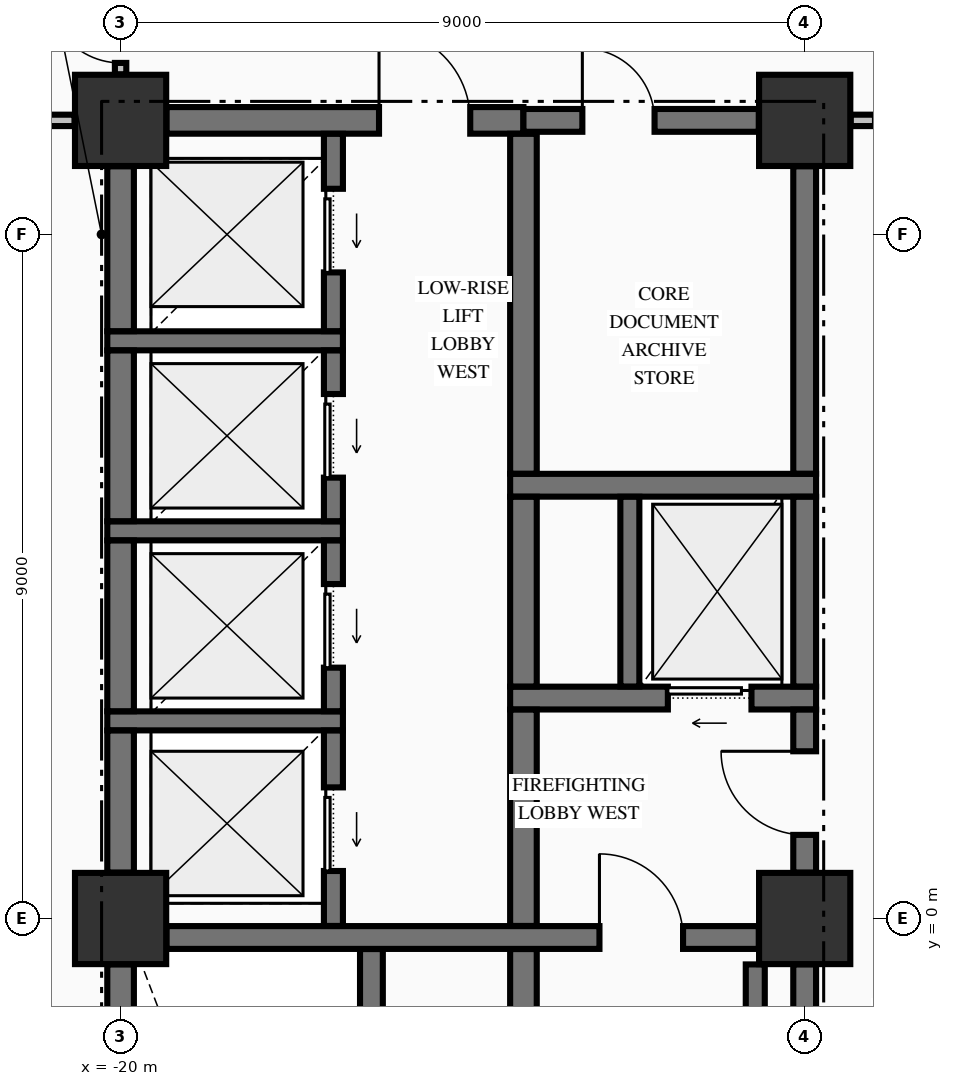
"""IFC4 building model, lengths in metres.
Left out: names, types, materials, properties, quantities, classifications, styles, units other than length and angle.
Written with IfcOpenShell. Run it as: python <this file> out.ifc"""

import sys

from ifc_helpers import new_model, si_unit, direction, frame, frame_2d, origin, origin_2d, place, context, subcontext, project, spatial, rectangle, extrude, element, fill, save


model = new_model("IFC4")
c1 = context("Model", 3, precision=1e-05, world=origin(), true_north=direction((0.0, 1.0)))
c2 = subcontext(c1, "Body", "Model", "MODEL_VIEW")
j1 = project(units=[si_unit("LENGTHUNIT", "METRE"), si_unit("PLANEANGLEUNIT", "RADIAN")], contexts=[c1])
p1 = place(None, origin())
s1 = spatial("IfcSite", under=j1, at=p1, CompositionType="ELEMENT")
p2 = place(p1, origin())
s2 = spatial("IfcBuilding", under=s1, at=p2, CompositionType="ELEMENT")
p3 = place(p2, frame((0.0, 0.0, 37.91)))
s3 = spatial("IfcBuildingStorey", under=s2, at=p3, CompositionType="ELEMENT", Elevation=37.91)
for number, where, z_axis, x_axis in (
    (1, (-20.0, 10.5, -0.25), (0.0, 0.0, 1.0), (1.0, 0.0, 0.0)),
    (2, (-11.0, 0.0, -0.25), (0.0, 0.0, 1.0), (1.0, 0.0, 0.0)),
    (3, (-11.0, 10.5, -0.25), (0.0, 0.0, 1.0), (1.0, 0.0, 0.0)),
    (4, (-20.0, 0.0, -0.25), (0.0, 0.0, 1.0), (1.0, 0.0, 0.0)),
):
    element("IfcColumn", number, at=place(p3, frame(where, z_axis=z_axis, x_axis=x_axis)), inside=s3, PredefinedType="COLUMN", context=c2, shape_type="SweptSolid", body=[
        extrude(rectangle(XDim=1.2, YDim=1.2, at=origin_2d()), origin(), (0.0, 0.0, 1.0), 3.57),
    ])
p4 = place(p3, frame((-19.396, -0.25, 0.0), z_axis=(0.0, 0.0, 1.0), x_axis=(1.0, 0.0, 0.0)))
e5 = element("IfcWall", 5, at=p4, inside=s3, PredefinedType="SHEAR", context=c2, shape_type="SweptSolid", body=[
    extrude(rectangle(XDim=7.792, YDim=0.3, at=frame_2d((3.896, 0.0))), origin(), (0.0, 0.0, 1.0), 3.32),
])
p5 = place(p4, frame((5.696, 0.0, 0.0)))
e6 = element("IfcOpeningElement", 6, at=p5, cuts=e5, PredefinedType="OPENING", context=c2, shape_type="SweptSolid", body=[
    extrude(rectangle(XDim=1.1, YDim=2.15, at=frame_2d((0.55, 1.075))), frame((0.0, 0.16, 0.0), z_axis=(0.0, -1.0, 0.0), x_axis=(1.0, 0.0, 0.0)), (0.0, 0.0, 1.0), 0.32),
])
p6 = place(p3, frame((-20.175, 2.6, 0.0), z_axis=(0.0, 0.0, 1.0), x_axis=(1.0, 0.0, 0.0)))
e7 = element("IfcWall", 7, at=p6, inside=s3, PredefinedType="SOLIDWALL", context=c2, shape_type="SweptSolid", body=[
    extrude(rectangle(XDim=3.1, YDim=0.25, at=frame_2d((1.55, 0.0))), origin(), (0.0, 0.0, 1.0), 3.32),
])
p7 = place(p3, frame((-14.875, 2.9, 0.0), z_axis=(0.0, 0.0, 1.0), x_axis=(1.0, 0.0, 0.0)))
e8 = element("IfcWall", 8, at=p7, inside=s3, PredefinedType="SHEAR", context=c2, shape_type="SweptSolid", body=[
    extrude(rectangle(XDim=4.025, YDim=0.3, at=frame_2d((2.012, 0.0))), origin(), (0.0, 0.0, 1.0), 3.32),
])
p8 = place(p7, frame((2.075, 0.0, 0.0)))
e9 = element("IfcOpeningElement", 9, at=p8, cuts=e8, PredefinedType="OPENING", context=c2, shape_type="SweptSolid", body=[
    extrude(rectangle(XDim=1.1, YDim=2.2, at=frame_2d((0.55, 1.1))), frame((0.0, 0.16, 0.0), z_axis=(0.0, -1.0, 0.0), x_axis=(1.0, 0.0, 0.0)), (0.0, 0.0, 1.0), 0.32),
])
p9 = place(p3, frame((-20.175, 5.1, 0.0), z_axis=(0.0, 0.0, 1.0), x_axis=(1.0, 0.0, 0.0)))
e10 = element("IfcWall", 10, at=p9, inside=s3, PredefinedType="SOLIDWALL", context=c2, shape_type="SweptSolid", body=[
    extrude(rectangle(XDim=3.1, YDim=0.25, at=frame_2d((1.55, 0.0))), origin(), (0.0, 0.0, 1.0), 3.32),
])
p10 = place(p3, frame((-14.875, 5.7, 0.0), z_axis=(0.0, 0.0, 1.0), x_axis=(1.0, 0.0, 0.0)))
e11 = element("IfcWall", 11, at=p10, inside=s3, PredefinedType="SHEAR", context=c2, shape_type="SweptSolid", body=[
    extrude(rectangle(XDim=4.025, YDim=0.3, at=frame_2d((2.012, 0.0))), origin(), (0.0, 0.0, 1.0), 3.32),
])
p11 = place(p3, frame((-20.175, 7.6, 0.0), z_axis=(0.0, 0.0, 1.0), x_axis=(1.0, 0.0, 0.0)))
e12 = element("IfcWall", 12, at=p11, inside=s3, PredefinedType="SOLIDWALL", context=c2, shape_type="SweptSolid", body=[
    extrude(rectangle(XDim=3.1, YDim=0.25, at=frame_2d((1.55, 0.0))), origin(), (0.0, 0.0, 1.0), 3.32),
])
p12 = place(p3, frame((-19.396, 10.5, 0.0), z_axis=(0.0, 0.0, 1.0), x_axis=(1.0, 0.0, 0.0)))
e13 = element("IfcWall", 13, at=p12, inside=s3, PredefinedType="SHEAR", context=c2, shape_type="SweptSolid", body=[
    extrude(rectangle(XDim=4.696, YDim=0.35, at=frame_2d((2.348, 0.0))), origin(), (0.0, 0.0, 1.0), 3.32),
])
p13 = place(p12, frame((2.796, 0.0, 0.0)))
e14 = element("IfcOpeningElement", 14, at=p13, cuts=e13, PredefinedType="OPENING", context=c2, shape_type="SweptSolid", body=[
    extrude(rectangle(XDim=1.2, YDim=2.15, at=frame_2d((0.6, 1.075))), frame((0.0, 0.185, 0.0), z_axis=(0.0, -1.0, 0.0), x_axis=(1.0, 0.0, 0.0)), (0.0, 0.0, 1.0), 0.37),
])
p14 = place(p3, frame((-14.7, 10.5, 0.0), z_axis=(0.0, 0.0, 1.0), x_axis=(1.0, 0.0, 0.0)))
e15 = element("IfcWall", 15, at=p14, inside=s3, PredefinedType="SHEAR", context=c2, shape_type="SweptSolid", body=[
    extrude(rectangle(XDim=3.096, YDim=0.3, at=frame_2d((1.548, 0.0))), origin(), (0.0, 0.0, 1.0), 3.32),
])
p15 = place(p14, frame((0.775, 0.0, 0.0)))
e16 = element("IfcOpeningElement", 16, at=p15, cuts=e15, PredefinedType="OPENING", context=c2, shape_type="SweptSolid", body=[
    extrude(rectangle(XDim=0.95, YDim=2.15, at=frame_2d((0.475, 1.075))), frame((0.0, 0.16, 0.0), z_axis=(0.0, -1.0, 0.0), x_axis=(1.0, 0.0, 0.0)), (0.0, 0.0, 1.0), 0.32),
])
p16 = place(p3, frame((-23.835, 10.5, 0.0), z_axis=(0.0, 0.0, 1.0), x_axis=(1.0, 0.0, 0.0)))
e17 = element("IfcWall", 17, at=p16, inside=s3, PredefinedType="PARTITIONING", context=c2, shape_type="SweptSolid", body=[
    extrude(rectangle(XDim=3.229, YDim=0.15, at=frame_2d((1.615, 0.0))), origin(), (0.0, 0.0, 1.0), 3.32),
])
p17 = place(p16, frame((1.335, 0.0, 0.0)))
e18 = element("IfcOpeningElement", 18, at=p17, cuts=e17, PredefinedType="OPENING", context=c2, shape_type="SweptSolid", body=[
    extrude(rectangle(XDim=1.0, YDim=2.15, at=frame_2d((0.5, 1.075))), frame((0.0, 0.085, 0.0), z_axis=(0.0, -1.0, 0.0), x_axis=(1.0, 0.0, 0.0)), (0.0, 0.0, 1.0), 0.17),
])
p18 = place(p3, frame((-10.394, 10.5, 0.0), z_axis=(0.0, 0.0, 1.0), x_axis=(1.0, 0.0, 0.0)))
e19 = element("IfcWall", 19, at=p18, inside=s3, PredefinedType="PARTITIONING", context=c2, shape_type="SweptSolid", body=[
    extrude(rectangle(XDim=20.788, YDim=0.15, at=frame_2d((10.394, 0.0))), origin(), (0.0, 0.0, 1.0), 3.32),
])
p19 = place(p18, frame((0.319, 0.0, 0.0)))
e20 = element("IfcOpeningElement", 20, at=p19, cuts=e19, PredefinedType="OPENING", context=c2, shape_type="SweptSolid", body=[
    extrude(rectangle(XDim=1.05, YDim=2.15, at=frame_2d((0.525, 1.075))), frame((0.0, 0.085, 0.0), z_axis=(0.0, -1.0, 0.0), x_axis=(1.0, 0.0, 0.0)), (0.0, 0.0, 1.0), 0.17),
])
p20 = place(p18, frame((19.419, 0.0, 0.0)))
e21 = element("IfcOpeningElement", 21, at=p20, cuts=e19, PredefinedType="OPENING", context=c2, shape_type="SweptSolid", body=[
    extrude(rectangle(XDim=1.05, YDim=2.15, at=frame_2d((0.525, 1.075))), frame((0.0, 0.085, 0.0), z_axis=(0.0, -1.0, 0.0), x_axis=(1.0, 0.0, 0.0)), (0.0, 0.0, 1.0), 0.17),
])
p21 = place(p3, frame((-20.0, -9.346, 0.0), z_axis=(0.0, 0.0, 1.0), x_axis=(0.0, 1.0, 0.0)))
e22 = element("IfcWall", 22, at=p21, inside=s3, PredefinedType="SHEAR", context=c2, shape_type="SweptSolid", body=[
    extrude(rectangle(XDim=8.742, YDim=0.35, at=frame_2d((4.371, 0.0))), origin(), (0.0, 0.0, 1.0), 3.32),
])
p22 = place(p3, frame((-20.0, 0.604, 0.0), z_axis=(0.0, 0.0, 1.0), x_axis=(0.0, 1.0, 0.0)))
e23 = element("IfcWall", 23, at=p22, inside=s3, PredefinedType="SHEAR", context=c2, shape_type="SweptSolid", body=[
    extrude(rectangle(XDim=1.869, YDim=0.35, at=frame_2d((0.935, 0.0))), origin(), (0.0, 0.0, 1.0), 3.32),
])
for number, where, z_axis, x_axis in (
    (24, (-20.0, 2.727, 0.0), (0.0, 0.0, 1.0), (0.0, 1.0, 0.0)),
    (25, (-20.0, 5.227, 0.0), (0.0, 0.0, 1.0), (0.0, 1.0, 0.0)),
):
    element("IfcWall", number, at=place(p3, frame(where, z_axis=z_axis, x_axis=x_axis)), inside=s3, PredefinedType="SHEAR", context=c2, shape_type="SweptSolid", body=[
        extrude(rectangle(XDim=2.246, YDim=0.35, at=frame_2d((1.123, 0.0))), origin(), (0.0, 0.0, 1.0), 3.32),
    ])
p23 = place(p3, frame((-20.0, 7.727, 0.0), z_axis=(0.0, 0.0, 1.0), x_axis=(0.0, 1.0, 0.0)))
e26 = element("IfcWall", 26, at=p23, inside=s3, PredefinedType="SHEAR", context=c2, shape_type="SweptSolid", body=[
    extrude(rectangle(XDim=2.169, YDim=0.35, at=frame_2d((1.084, 0.0))), origin(), (0.0, 0.0, 1.0), 3.32),
])
p24 = place(p3, frame((-17.2, -0.098, 0.0), z_axis=(0.0, 0.0, 1.0), x_axis=(0.0, 1.0, 0.0)))
e27 = element("IfcWall", 27, at=p24, inside=s3, PredefinedType="SOLIDWALL", context=c2, shape_type="SweptSolid", body=[
    extrude(rectangle(XDim=2.571, YDim=0.25, at=frame_2d((1.285, 0.0))), origin(), (0.0, 0.0, 1.0), 3.32),
])
p25 = place(p24, frame((0.723, 0.0, 0.0)))
e28 = element("IfcOpeningElement", 28, at=p25, cuts=e27, PredefinedType="OPENING", context=c2, shape_type="SweptSolid", body=[
    extrude(rectangle(XDim=1.1, YDim=2.2, at=frame_2d((0.55, 1.1))), frame((0.0, 0.135, 0.0), z_axis=(0.0, -1.0, 0.0), x_axis=(1.0, 0.0, 0.0)), (0.0, 0.0, 1.0), 0.27),
])
p26 = place(p3, frame((-17.2, 2.727, 0.0), z_axis=(0.0, 0.0, 1.0), x_axis=(0.0, 1.0, 0.0)))
e29 = element("IfcWall", 29, at=p26, inside=s3, PredefinedType="SOLIDWALL", context=c2, shape_type="SweptSolid", body=[
    extrude(rectangle(XDim=2.246, YDim=0.25, at=frame_2d((1.123, 0.0))), origin(), (0.0, 0.0, 1.0), 3.32),
])
p27 = place(p26, frame((0.573, 0.0, 0.0)))
e30 = element("IfcOpeningElement", 30, at=p27, cuts=e29, PredefinedType="OPENING", context=c2, shape_type="SweptSolid", body=[
    extrude(rectangle(XDim=1.1, YDim=2.2, at=frame_2d((0.55, 1.1))), frame((0.0, 0.135, 0.0), z_axis=(0.0, -1.0, 0.0), x_axis=(1.0, 0.0, 0.0)), (0.0, 0.0, 1.0), 0.27),
])
p28 = place(p3, frame((-17.2, 5.227, 0.0), z_axis=(0.0, 0.0, 1.0), x_axis=(0.0, 1.0, 0.0)))
e31 = element("IfcWall", 31, at=p28, inside=s3, PredefinedType="SOLIDWALL", context=c2, shape_type="SweptSolid", body=[
    extrude(rectangle(XDim=2.246, YDim=0.25, at=frame_2d((1.123, 0.0))), origin(), (0.0, 0.0, 1.0), 3.32),
])
p29 = place(p28, frame((0.573, 0.0, 0.0)))
e32 = element("IfcOpeningElement", 32, at=p29, cuts=e31, PredefinedType="OPENING", context=c2, shape_type="SweptSolid", body=[
    extrude(rectangle(XDim=1.1, YDim=2.2, at=frame_2d((0.55, 1.1))), frame((0.0, 0.135, 0.0), z_axis=(0.0, -1.0, 0.0), x_axis=(1.0, 0.0, 0.0)), (0.0, 0.0, 1.0), 0.27),
])
p30 = place(p3, frame((-17.2, 7.727, 0.0), z_axis=(0.0, 0.0, 1.0), x_axis=(0.0, 1.0, 0.0)))
e33 = element("IfcWall", 33, at=p30, inside=s3, PredefinedType="SOLIDWALL", context=c2, shape_type="SweptSolid", body=[
    extrude(rectangle(XDim=2.596, YDim=0.25, at=frame_2d((1.298, 0.0))), origin(), (0.0, 0.0, 1.0), 3.32),
])
p31 = place(p30, frame((0.773, 0.0, 0.0)))
e34 = element("IfcOpeningElement", 34, at=p31, cuts=e33, PredefinedType="OPENING", context=c2, shape_type="SweptSolid", body=[
    extrude(rectangle(XDim=1.1, YDim=2.2, at=frame_2d((0.55, 1.1))), frame((0.0, 0.135, 0.0), z_axis=(0.0, -1.0, 0.0), x_axis=(1.0, 0.0, 0.0)), (0.0, 0.0, 1.0), 0.27),
])
p32 = place(p3, frame((-16.7, -9.773, 0.0), z_axis=(0.0, 0.0, 1.0), x_axis=(0.0, 1.0, 0.0)))
e35 = element("IfcWall", 35, at=p32, inside=s3, PredefinedType="SHEAR", context=c2, shape_type="SweptSolid", body=[
    extrude(rectangle(XDim=9.371, YDim=0.3, at=frame_2d((4.686, 0.0))), origin(), (0.0, 0.0, 1.0), 3.32),
])
p33 = place(p3, frame((-14.7, -9.773, 0.0), z_axis=(0.0, 0.0, 1.0), x_axis=(0.0, 1.0, 0.0)))
e36 = element("IfcWall", 36, at=p33, inside=s3, PredefinedType="SHEAR", context=c2, shape_type="SweptSolid", body=[
    extrude(rectangle(XDim=9.371, YDim=0.35, at=frame_2d((4.686, 0.0))), origin(), (0.0, 0.0, 1.0), 3.32),
])
p34 = place(p3, frame((-14.7, -0.098, 0.0), z_axis=(0.0, 0.0, 1.0), x_axis=(0.0, 1.0, 0.0)))
e37 = element("IfcWall", 37, at=p34, inside=s3, PredefinedType="SHEAR", context=c2, shape_type="SweptSolid", body=[
    extrude(rectangle(XDim=2.846, YDim=0.35, at=frame_2d((1.423, 0.0))), origin(), (0.0, 0.0, 1.0), 3.32),
])
p35 = place(p3, frame((-14.7, 3.052, 0.0), z_axis=(0.0, 0.0, 1.0), x_axis=(0.0, 1.0, 0.0)))
e38 = element("IfcWall", 38, at=p35, inside=s3, PredefinedType="SHEAR", context=c2, shape_type="SweptSolid", body=[
    extrude(rectangle(XDim=2.496, YDim=0.35, at=frame_2d((1.248, 0.0))), origin(), (0.0, 0.0, 1.0), 3.32),
])
p36 = place(p3, frame((-14.7, 5.852, 0.0), z_axis=(0.0, 0.0, 1.0), x_axis=(0.0, 1.0, 0.0)))
e39 = element("IfcWall", 39, at=p36, inside=s3, PredefinedType="SHEAR", context=c2, shape_type="SweptSolid", body=[
    extrude(rectangle(XDim=4.471, YDim=0.35, at=frame_2d((2.235, 0.0))), origin(), (0.0, 0.0, 1.0), 3.32),
])
p37 = place(p3, frame((-13.3, 3.052, 0.0), z_axis=(0.0, 0.0, 1.0), x_axis=(0.0, 1.0, 0.0)))
e40 = element("IfcWall", 40, at=p37, inside=s3, PredefinedType="SOLIDWALL", context=c2, shape_type="SweptSolid", body=[
    extrude(rectangle(XDim=2.496, YDim=0.25, at=frame_2d((1.248, 0.0))), origin(), (0.0, 0.0, 1.0), 3.32),
])
p38 = place(p3, frame((-11.65, -9.346, 0.0), z_axis=(0.0, 0.0, 1.0), x_axis=(0.0, 1.0, 0.0)))
e41 = element("IfcWall", 41, at=p38, inside=s3, PredefinedType="SOLIDWALL", context=c2, shape_type="SweptSolid", body=[
    extrude(rectangle(XDim=8.742, YDim=0.25, at=frame_2d((4.371, 0.0))), origin(), (0.0, 0.0, 1.0), 3.32),
])
p39 = place(p3, frame((-11.0, -9.346, 0.0), z_axis=(0.0, 0.0, 1.0), x_axis=(0.0, 1.0, 0.0)))
e42 = element("IfcWall", 42, at=p39, inside=s3, PredefinedType="SHEAR", context=c2, shape_type="SweptSolid", body=[
    extrude(rectangle(XDim=8.742, YDim=0.3, at=frame_2d((4.371, 0.0))), origin(), (0.0, 0.0, 1.0), 3.32),
])
p40 = place(p3, frame((-11.0, 0.604, 0.0), z_axis=(0.0, 0.0, 1.0), x_axis=(0.0, 1.0, 0.0)))
e43 = element("IfcWall", 43, at=p40, inside=s3, PredefinedType="SHEAR", context=c2, shape_type="SweptSolid", body=[
    extrude(rectangle(XDim=2.144, YDim=0.3, at=frame_2d((1.072, 0.0))), origin(), (0.0, 0.0, 1.0), 3.32),
])
p41 = place(p40, frame((0.496, 0.0, 0.0)))
e44 = element("IfcOpeningElement", 44, at=p41, cuts=e43, PredefinedType="OPENING", context=c2, shape_type="SweptSolid", body=[
    extrude(rectangle(XDim=1.1, YDim=2.15, at=frame_2d((0.55, 1.075))), frame((0.0, 0.16, 0.0), z_axis=(0.0, -1.0, 0.0), x_axis=(1.0, 0.0, 0.0)), (0.0, 0.0, 1.0), 0.32),
])
p42 = place(p3, frame((-11.0, 3.052, 0.0), z_axis=(0.0, 0.0, 1.0), x_axis=(0.0, 1.0, 0.0)))
e45 = element("IfcWall", 45, at=p42, inside=s3, PredefinedType="SHEAR", context=c2, shape_type="SweptSolid", body=[
    extrude(rectangle(XDim=2.496, YDim=0.3, at=frame_2d((1.248, 0.0))), origin(), (0.0, 0.0, 1.0), 3.32),
])
p43 = place(p3, frame((-11.0, 5.852, 0.0), z_axis=(0.0, 0.0, 1.0), x_axis=(0.0, 1.0, 0.0)))
e46 = element("IfcWall", 46, at=p43, inside=s3, PredefinedType="SHEAR", context=c2, shape_type="SweptSolid", body=[
    extrude(rectangle(XDim=4.044, YDim=0.3, at=frame_2d((2.022, 0.0))), origin(), (0.0, 0.0, 1.0), 3.32),
])
p44 = place(p3, frame((-20.0, 11.106, 0.0), z_axis=(0.0, 0.0, 1.0), x_axis=(0.0, 1.0, 0.0)))
e47 = element("IfcWall", 47, at=p44, inside=s3, PredefinedType="PARTITIONING", context=c2, shape_type="SweptSolid", body=[
    extrude(rectangle(XDim=1.566, YDim=0.15, at=frame_2d((0.783, 0.0))), origin(), (0.0, 0.0, 1.0), 3.32),
])
p45 = place(p44, frame((0.15, 0.0, 0.0)))
e48 = element("IfcOpeningElement", 48, at=p45, cuts=e47, PredefinedType="OPENING", context=c2, shape_type="SweptSolid", body=[
    extrude(rectangle(XDim=0.95, YDim=2.15, at=frame_2d((0.475, 1.075))), frame((0.0, 0.085, 0.0), z_axis=(0.0, -1.0, 0.0), x_axis=(1.0, 0.0, 0.0)), (0.0, 0.0, 1.0), 0.17),
])
p46 = place(p5, origin())
e49 = element("IfcDoor", 49, at=p46, inside=s3, OperationType="SINGLE_SWING_LEFT", PredefinedType="DOOR", context=c2, shape_type="SweptSolid", body=[
    extrude(rectangle(XDim=1.1, YDim=2.15, at=frame_2d((0.55, 1.075))), frame((0.0, 0.025, 0.0), z_axis=(0.0, -1.0, 0.0), x_axis=(1.0, 0.0, 0.0)), (0.0, 0.0, 1.0), 0.05),
])
fill(e6, e49)
p47 = place(p41, origin())
e50 = element("IfcDoor", 50, at=p47, inside=s3, OperationType="SINGLE_SWING_RIGHT", PredefinedType="DOOR", context=c2, shape_type="SweptSolid", body=[
    extrude(rectangle(XDim=1.1, YDim=2.15, at=frame_2d((0.55, 1.075))), frame((0.0, 0.025, 0.0), z_axis=(0.0, -1.0, 0.0), x_axis=(1.0, 0.0, 0.0)), (0.0, 0.0, 1.0), 0.05),
])
fill(e44, e50)
p48 = place(p8, origin())
e51 = element("IfcDoor", 51, at=p48, inside=s3, OperationType="SLIDING_TO_LEFT", PredefinedType="DOOR", context=c2, shape_type="SweptSolid", body=[
    extrude(rectangle(XDim=1.1, YDim=2.2, at=frame_2d((0.55, 1.1))), frame((0.0, 0.025, 0.0), z_axis=(0.0, -1.0, 0.0), x_axis=(1.0, 0.0, 0.0)), (0.0, 0.0, 1.0), 0.05),
])
fill(e9, e51)
p49 = place(p15, origin())
e52 = element("IfcDoor", 52, at=p49, inside=s3, OperationType="SINGLE_SWING_LEFT", PredefinedType="DOOR", context=c2, shape_type="SweptSolid", body=[
    extrude(rectangle(XDim=0.95, YDim=2.15, at=frame_2d((0.475, 1.075))), frame((0.0, 0.025, 0.0), z_axis=(0.0, -1.0, 0.0), x_axis=(1.0, 0.0, 0.0)), (0.0, 0.0, 1.0), 0.05),
])
fill(e16, e52)
p50 = place(p13, origin())
e53 = element("IfcDoor", 53, at=p50, inside=s3, OperationType="SINGLE_SWING_LEFT", PredefinedType="DOOR", context=c2, shape_type="SweptSolid", body=[
    extrude(rectangle(XDim=1.2, YDim=2.15, at=frame_2d((0.6, 1.075))), frame((0.0, 0.025, 0.0), z_axis=(0.0, -1.0, 0.0), x_axis=(1.0, 0.0, 0.0)), (0.0, 0.0, 1.0), 0.05),
])
fill(e14, e53)
p51 = place(p25, origin())
e54 = element("IfcDoor", 54, at=p51, inside=s3, OperationType="SLIDING_TO_LEFT", PredefinedType="DOOR", context=c2, shape_type="SweptSolid", body=[
    extrude(rectangle(XDim=1.1, YDim=2.2, at=frame_2d((0.55, 1.1))), frame((0.0, 0.025, 0.0), z_axis=(0.0, -1.0, 0.0), x_axis=(1.0, 0.0, 0.0)), (0.0, 0.0, 1.0), 0.05),
])
fill(e28, e54)
p52 = place(p27, origin())
e55 = element("IfcDoor", 55, at=p52, inside=s3, OperationType="SLIDING_TO_LEFT", PredefinedType="DOOR", context=c2, shape_type="SweptSolid", body=[
    extrude(rectangle(XDim=1.1, YDim=2.2, at=frame_2d((0.55, 1.1))), frame((0.0, 0.025, 0.0), z_axis=(0.0, -1.0, 0.0), x_axis=(1.0, 0.0, 0.0)), (0.0, 0.0, 1.0), 0.05),
])
fill(e30, e55)
p53 = place(p29, origin())
e56 = element("IfcDoor", 56, at=p53, inside=s3, OperationType="SLIDING_TO_LEFT", PredefinedType="DOOR", context=c2, shape_type="SweptSolid", body=[
    extrude(rectangle(XDim=1.1, YDim=2.2, at=frame_2d((0.55, 1.1))), frame((0.0, 0.025, 0.0), z_axis=(0.0, -1.0, 0.0), x_axis=(1.0, 0.0, 0.0)), (0.0, 0.0, 1.0), 0.05),
])
fill(e32, e56)
p54 = place(p31, origin())
e57 = element("IfcDoor", 57, at=p54, inside=s3, OperationType="SLIDING_TO_LEFT", PredefinedType="DOOR", context=c2, shape_type="SweptSolid", body=[
    extrude(rectangle(XDim=1.1, YDim=2.2, at=frame_2d((0.55, 1.1))), frame((0.0, 0.025, 0.0), z_axis=(0.0, -1.0, 0.0), x_axis=(1.0, 0.0, 0.0)), (0.0, 0.0, 1.0), 0.05),
])
fill(e34, e57)
p55 = place(p45, origin())
e58 = element("IfcDoor", 58, at=p55, inside=s3, OperationType="SINGLE_SWING_RIGHT", PredefinedType="DOOR", context=c2, shape_type="SweptSolid", body=[
    extrude(rectangle(XDim=0.95, YDim=2.15, at=frame_2d((0.475, 1.075))), frame((0.0, 0.025, 0.0), z_axis=(0.0, -1.0, 0.0), x_axis=(1.0, 0.0, 0.0)), (0.0, 0.0, 1.0), 0.05),
])
fill(e48, e58)
save(model, sys.argv[1])
